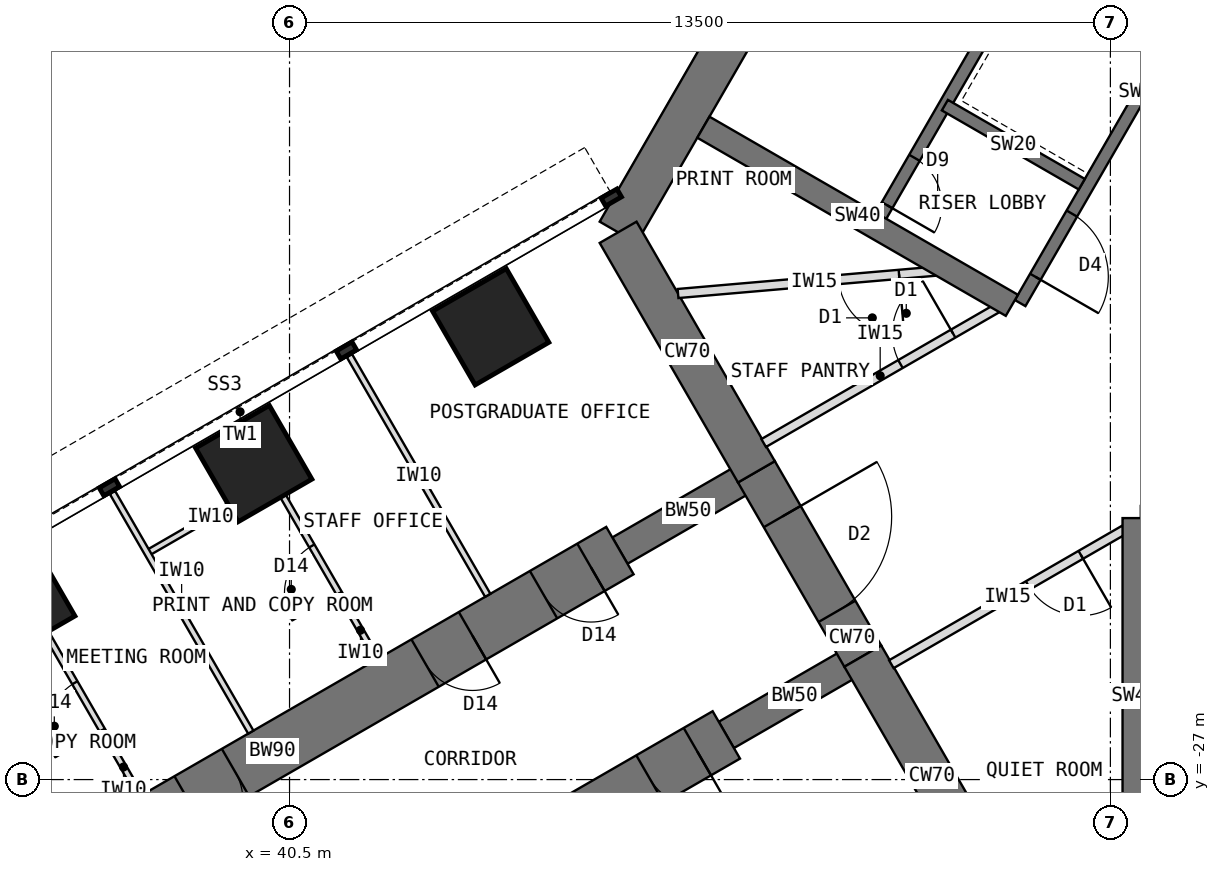
"""IFC4 building model, lengths in metres.
Left out: names, types, materials, properties, quantities, classifications, styles, units other than length and angle.
Written with IfcOpenShell. Run it as: python <this file> out.ifc"""

import sys

from ifc_helpers import new_model, si_unit, direction, frame, frame_2d, origin, origin_2d, place, context, subcontext, project, spatial, rectangle, extrude, element, fill, save


model = new_model("IFC4")
c1 = context("Model", 3, precision=1e-05, world=origin(), true_north=direction((0.0, 1.0)))
c2 = subcontext(c1, "Body", "Model", "MODEL_VIEW")
j1 = project(units=[si_unit("LENGTHUNIT", "METRE"), si_unit("PLANEANGLEUNIT", "RADIAN")], contexts=[c1])
p1 = place(None, origin())
s1 = spatial("IfcSite", under=j1, at=p1, CompositionType="ELEMENT")
p2 = place(p1, origin())
s2 = spatial("IfcBuilding", under=s1, at=p2, CompositionType="ELEMENT")
p3 = place(p2, frame((0.0, 0.0, 84.5)))
s3 = spatial("IfcBuildingStorey", under=s2, at=p3, CompositionType="ELEMENT", Elevation=84.5)
p4 = place(p3, frame((52.202, -7.092, 0.0), z_axis=(0.0, 0.0, 1.0), x_axis=(-0.500005998175, -0.866021940709, 0.0)))
e1 = element("IfcWall", 1, at=p4, inside=s3, PredefinedType="SHEAR", context=c2, shape_type="SweptSolid", body=[
    extrude(rectangle(XDim=12.596, YDim=0.7, at=frame_2d((6.298, 0.0))), origin(), (0.0, 0.0, 1.0), 4.0),
])
p5 = place(p3, frame((45.904, -18.0, 0.0), z_axis=(0.0, 0.0, 1.0), x_axis=(0.500024481964, -0.866011268655, 0.0)))
e2 = element("IfcWall", 2, at=p5, inside=s3, PredefinedType="SHEAR", context=c2, shape_type="SweptSolid", body=[
    extrude(rectangle(XDim=4.548, YDim=0.7, at=frame_2d((2.274, 0.0))), origin(), (0.0, 0.0, 1.0), 4.0),
])
p6 = place(p3, frame((48.178, -21.939, 0.0), z_axis=(0.0, 0.0, 1.0), x_axis=(0.500010275428, -0.866019471182, 0.0)))
e3 = element("IfcWall", 3, at=p6, inside=s3, PredefinedType="SHEAR", context=c2, shape_type="SweptSolid", body=[
    extrude(rectangle(XDim=3.5, YDim=0.7, at=frame_2d((1.75, 0.0))), origin(), (0.0, 0.0, 1.0), 4.0),
])
p7 = place(p6, frame((0.85, 0.0, 0.0)))
e4 = element("IfcOpeningElement", 4, at=p7, cuts=e3, PredefinedType="OPENING", context=c2, shape_type="SweptSolid", body=[
    extrude(rectangle(XDim=1.8, YDim=2.1, at=frame_2d((0.9, 1.05))), frame((0.0, 0.36, 0.0), z_axis=(0.0, -1.0, 0.0), x_axis=(1.0, 0.0, 0.0)), (0.0, 0.0, 1.0), 0.72),
])
p8 = place(p3, frame((49.928, -24.97, 0.0), z_axis=(0.0, 0.0, 1.0), x_axis=(0.499984222037, -0.866034513004, 0.0)))
e5 = element("IfcWall", 5, at=p8, inside=s3, PredefinedType="SHEAR", context=c2, shape_type="SweptSolid", body=[
    extrude(rectangle(XDim=4.548, YDim=0.7, at=frame_2d((2.274, 0.0))), origin(), (0.0, 0.0, 1.0), 4.0),
])
p9 = place(p3, frame((49.928, -24.97, 0.0), z_axis=(0.0, 0.0, 1.0), x_axis=(-0.866031863473, -0.499988811324, 0.0)))
e6 = element("IfcWall", 6, at=p9, inside=s3, PredefinedType="SHEAR", context=c2, shape_type="SweptSolid", body=[
    extrude(rectangle(XDim=2.592, YDim=0.5, at=frame_2d((1.296, 0.0))), origin(), (0.0, 0.0, 1.0), 4.0),
])
p10 = place(p3, frame((47.684, -26.266, 0.0), z_axis=(0.0, 0.0, 1.0), x_axis=(-0.866027579429, -0.499996231654, 0.0)))
e7 = element("IfcWall", 7, at=p10, inside=s3, PredefinedType="SHEAR", context=c2, shape_type="SweptSolid", body=[
    extrude(rectangle(XDim=13.2, YDim=0.9, at=frame_2d((6.6, 0.0))), origin(), (0.0, 0.0, 1.0), 4.0),
])
p11 = place(p10, frame((0.55, 0.0, 0.0)))
e8 = element("IfcOpeningElement", 8, at=p11, cuts=e7, PredefinedType="OPENING", context=c2, shape_type="SweptSolid", body=[
    extrude(rectangle(XDim=0.9, YDim=2.1, at=frame_2d((0.45, 1.05))), frame((0.0, 0.46, 0.0), z_axis=(0.0, -1.0, 0.0), x_axis=(1.0, 0.0, 0.0)), (0.0, 0.0, 1.0), 0.92),
])
p12 = place(p10, frame((2.8, 0.0, 0.0)))
e9 = element("IfcOpeningElement", 9, at=p12, cuts=e7, PredefinedType="OPENING", context=c2, shape_type="SweptSolid", body=[
    extrude(rectangle(XDim=0.9, YDim=2.1, at=frame_2d((0.45, 1.05))), frame((0.0, 0.46, 0.0), z_axis=(0.0, -1.0, 0.0), x_axis=(1.0, 0.0, 0.0)), (0.0, 0.0, 1.0), 0.92),
])
p13 = place(p10, frame((7.3, 0.0, 0.0)))
e10 = element("IfcOpeningElement", 10, at=p13, cuts=e7, PredefinedType="OPENING", context=c2, shape_type="SweptSolid", body=[
    extrude(rectangle(XDim=0.9, YDim=2.1, at=frame_2d((0.45, 1.05))), frame((0.0, 0.46, 0.0), z_axis=(0.0, -1.0, 0.0), x_axis=(1.0, 0.0, 0.0)), (0.0, 0.0, 1.0), 0.92),
])
p14 = place(p3, frame((48.178, -21.939, 0.0), z_axis=(0.0, 0.0, 1.0), x_axis=(-0.866072649678, -0.499918158782, 0.0)))
e11 = element("IfcWall", 11, at=p14, inside=s3, PredefinedType="SHEAR", context=c2, shape_type="SweptSolid", body=[
    extrude(rectangle(XDim=2.592, YDim=0.5, at=frame_2d((1.296, 0.0))), origin(), (0.0, 0.0, 1.0), 4.0),
])
p15 = place(p3, frame((45.934, -23.234, 0.0), z_axis=(0.0, 0.0, 1.0), x_axis=(-0.866019570528, -0.500010103361, 0.0)))
e12 = element("IfcWall", 12, at=p15, inside=s3, PredefinedType="SHEAR", context=c2, shape_type="SweptSolid", body=[
    extrude(rectangle(XDim=13.2, YDim=0.9, at=frame_2d((6.6, 0.0))), origin(), (0.0, 0.0, 1.0), 4.0),
])
p16 = place(p15, frame((0.55, 0.0, 0.0)))
e13 = element("IfcOpeningElement", 13, at=p16, cuts=e12, PredefinedType="OPENING", context=c2, shape_type="SweptSolid", body=[
    extrude(rectangle(XDim=0.9, YDim=2.1, at=frame_2d((0.45, 1.05))), frame((0.0, 0.46, 0.0), z_axis=(0.0, -1.0, 0.0), x_axis=(1.0, 0.0, 0.0)), (0.0, 0.0, 1.0), 0.92),
])
p17 = place(p15, frame((2.8, 0.0, 0.0)))
e14 = element("IfcOpeningElement", 14, at=p17, cuts=e12, PredefinedType="OPENING", context=c2, shape_type="SweptSolid", body=[
    extrude(rectangle(XDim=0.9, YDim=2.1, at=frame_2d((0.45, 1.05))), frame((0.0, 0.46, 0.0), z_axis=(0.0, -1.0, 0.0), x_axis=(1.0, 0.0, 0.0)), (0.0, 0.0, 1.0), 0.92),
])
p18 = place(p15, frame((7.3, 0.0, 0.0)))
e15 = element("IfcOpeningElement", 15, at=p18, cuts=e12, PredefinedType="OPENING", context=c2, shape_type="SweptSolid", body=[
    extrude(rectangle(XDim=0.9, YDim=2.1, at=frame_2d((0.45, 1.05))), frame((0.0, 0.46, 0.0), z_axis=(0.0, -1.0, 0.0), x_axis=(1.0, 0.0, 0.0)), (0.0, 0.0, 1.0), 0.92),
])
for number, where, z_axis, x_axis in (
    (16, (43.809, -19.554, 0.0), (0.0, 0.0, 1.0), (0.866, 0.5, 0.0)),
    (17, (39.912, -21.804, 0.0), (0.0, 0.0, 1.0), (0.866, 0.5, 0.0)),
    (18, (36.014, -24.054, 0.0), (0.0, 0.0, 1.0), (0.866, 0.5, 0.0)),
):
    element("IfcColumn", number, at=place(p3, frame(where, z_axis=z_axis, x_axis=x_axis)), inside=s3, PredefinedType="COLUMN", context=c2, shape_type="SweptSolid", body=[
        extrude(rectangle(XDim=1.4, YDim=1.4, at=origin_2d()), origin(), (0.0, 0.0, 1.0), 4.0),
    ])
p19 = place(p3, frame((56.516, -12.236, 0.0), z_axis=(0.0, 0.0, 1.0), x_axis=(-0.49999894854, -0.866026010844, 0.0)))
e19 = element("IfcWall", 19, at=p19, inside=s3, PredefinedType="SHEAR", context=c2, shape_type="SweptSolid", body=[
    extrude(rectangle(XDim=8.0, YDim=0.2, at=frame_2d((4.0, 0.0))), origin(), (0.0, 0.0, 1.0), 4.0),
])
p20 = place(p19, frame((6.3, 0.0, 0.0)))
e20 = element("IfcOpeningElement", 20, at=p20, cuts=e19, PredefinedType="OPENING", context=c2, shape_type="SweptSolid", body=[
    extrude(rectangle(XDim=1.2, YDim=2.1, at=frame_2d((0.6, 1.05))), frame((0.0, 0.11, 0.0), z_axis=(0.0, -1.0, 0.0), x_axis=(1.0, 0.0, 0.0)), (0.0, 0.0, 1.0), 0.22),
])
p21 = place(p3, frame((53.53, -17.209, 0.0), z_axis=(0.0, 0.0, 1.0), x_axis=(-0.866062058628, 0.499936506574, 0.0)))
e21 = element("IfcWall", 21, at=p21, inside=s3, PredefinedType="SHEAR", context=c2, shape_type="SweptSolid", body=[
    extrude(rectangle(XDim=2.6, YDim=0.2, at=frame_2d((1.3, 0.0))), origin(), (0.0, 0.0, 1.0), 4.0),
])
p22 = place(p3, frame((54.178, -10.886, 0.0), z_axis=(0.0, 0.0, 1.0), x_axis=(-0.49999894854, -0.866026010844, 0.0)))
e22 = element("IfcWall", 22, at=p22, inside=s3, PredefinedType="SHEAR", context=c2, shape_type="SweptSolid", body=[
    extrude(rectangle(XDim=8.0, YDim=0.2, at=frame_2d((4.0, 0.0))), origin(), (0.0, 0.0, 1.0), 4.0),
])
p23 = place(p22, frame((6.8, 0.0, 0.0)))
e23 = element("IfcOpeningElement", 23, at=p23, cuts=e22, PredefinedType="OPENING", context=c2, shape_type="SweptSolid", body=[
    extrude(rectangle(XDim=0.9, YDim=2.1, at=frame_2d((0.45, 1.05))), frame((0.0, 0.11, 0.0), z_axis=(0.0, -1.0, 0.0), x_axis=(1.0, 0.0, 0.0)), (0.0, 0.0, 1.0), 0.22),
])
for number, where, z_axis, x_axis in (
    (24, (52.38, -19.201, 0.0), (0.0, 0.0, 1.0), (-0.866, 0.5, 0.0)),
    (25, (54.4, -22.7, 0.0), (0.0, 0.0, 1.0), (0.0, -1.0, 0.0)),
):
    element("IfcWall", number, at=place(p3, frame(where, z_axis=z_axis, x_axis=x_axis)), inside=s3, PredefinedType="SHEAR", context=c2, shape_type="SweptSolid", body=[
        extrude(rectangle(XDim=5.858, YDim=0.4, at=frame_2d((2.929, 0.0))), origin(), (0.0, 0.0, 1.0), 4.0),
    ])
for number, where, z_axis, x_axis in (
    (26, (43.76, -23.97, 0.0), (0.0, 0.0, 1.0), (-0.5, 0.866, 0.0)),
    (27, (39.863, -26.22, 0.0), (0.0, 0.0, 1.0), (-0.5, 0.866, 0.0)),
):
    element("IfcWall", number, at=place(p3, frame(where, z_axis=z_axis, x_axis=x_axis)), inside=s3, PredefinedType="PARTITIONING", context=c2, shape_type="SweptSolid", body=[
        extrude(rectangle(XDim=4.55, YDim=0.1, at=frame_2d((2.275, 0.0))), origin(), (0.0, 0.0, 1.0), 3.8),
    ])
p24 = place(p3, frame((40.241, -22.075, 0.0), z_axis=(0.0, 0.0, 1.0), x_axis=(-0.866024647952, -0.500001309137, 0.0)))
e28 = element("IfcWall", 28, at=p24, inside=s3, PredefinedType="PARTITIONING", context=c2, shape_type="SweptSolid", body=[
    extrude(rectangle(XDim=2.4, YDim=0.1, at=frame_2d((1.2, 0.0))), origin(), (0.0, 0.0, 1.0), 3.8),
])
p25 = place(p3, frame((41.941, -25.02, 0.0), z_axis=(0.0, 0.0, 1.0), x_axis=(-0.499977295307, 0.866038511948, 0.0)))
e29 = element("IfcWall", 29, at=p25, inside=s3, PredefinedType="PARTITIONING", context=c2, shape_type="SweptSolid", body=[
    extrude(rectangle(XDim=3.4, YDim=0.1, at=frame_2d((1.7, 0.0))), origin(), (0.0, 0.0, 1.0), 3.8),
])
p26 = place(p25, frame((1.25, 0.0, 0.0)))
e30 = element("IfcOpeningElement", 30, at=p26, cuts=e29, PredefinedType="OPENING", context=c2, shape_type="SweptSolid", body=[
    extrude(rectangle(XDim=0.9, YDim=2.1, at=frame_2d((0.45, 1.05))), frame((0.0, 0.06, 0.0), z_axis=(0.0, -1.0, 0.0), x_axis=(1.0, 0.0, 0.0)), (0.0, 0.0, 1.0), 0.12),
])
p27 = place(p3, frame((38.044, -27.27, 0.0), z_axis=(0.0, 0.0, 1.0), x_axis=(-0.500031147688, 0.866007419912, 0.0)))
e31 = element("IfcWall", 31, at=p27, inside=s3, PredefinedType="PARTITIONING", context=c2, shape_type="SweptSolid", body=[
    extrude(rectangle(XDim=3.4, YDim=0.1, at=frame_2d((1.7, 0.0))), origin(), (0.0, 0.0, 1.0), 3.8),
])
p28 = place(p27, frame((1.25, 0.0, 0.0)))
e32 = element("IfcOpeningElement", 32, at=p28, cuts=e31, PredefinedType="OPENING", context=c2, shape_type="SweptSolid", body=[
    extrude(rectangle(XDim=0.9, YDim=2.1, at=frame_2d((0.45, 1.05))), frame((0.0, 0.06, 0.0), z_axis=(0.0, -1.0, 0.0), x_axis=(1.0, 0.0, 0.0)), (0.0, 0.0, 1.0), 0.12),
])
p29 = place(p3, frame((48.298, -21.466, 0.0), z_axis=(0.0, 0.0, 1.0), x_axis=(0.866021148949, 0.500007369519, 0.0)))
e33 = element("IfcWall", 33, at=p29, inside=s3, PredefinedType="PARTITIONING", context=c2, shape_type="SweptSolid", body=[
    extrude(rectangle(XDim=4.426, YDim=0.15, at=frame_2d((2.213, 0.0))), origin(), (0.0, 0.0, 1.0), 3.8),
])
p30 = place(p29, frame((2.598, 0.0, 0.0)))
e34 = element("IfcOpeningElement", 34, at=p30, cuts=e33, PredefinedType="OPENING", context=c2, shape_type="SweptSolid", body=[
    extrude(rectangle(XDim=1.0, YDim=2.1, at=frame_2d((0.5, 1.05))), frame((0.0, 0.085, 0.0), z_axis=(0.0, -1.0, 0.0), x_axis=(1.0, 0.0, 0.0)), (0.0, 0.0, 1.0), 0.17),
])
p31 = place(p3, frame((54.23, -22.89, 0.0), z_axis=(0.0, 0.0, 1.0), x_axis=(-0.866021148949, -0.500007369519, 0.0)))
e35 = element("IfcWall", 35, at=p31, inside=s3, PredefinedType="PARTITIONING", context=c2, shape_type="SweptSolid", body=[
    extrude(rectangle(XDim=4.426, YDim=0.15, at=frame_2d((2.213, 0.0))), origin(), (0.0, 0.0, 1.0), 3.8),
])
p32 = place(p31, frame((0.828, 0.0, 0.0)))
e36 = element("IfcOpeningElement", 36, at=p32, cuts=e35, PredefinedType="OPENING", context=c2, shape_type="SweptSolid", body=[
    extrude(rectangle(XDim=1.0, YDim=2.1, at=frame_2d((0.5, 1.05))), frame((0.0, 0.085, 0.0), z_axis=(0.0, -1.0, 0.0), x_axis=(1.0, 0.0, 0.0)), (0.0, 0.0, 1.0), 0.17),
])
p33 = place(p3, frame((51.371, -18.618, 0.0), z_axis=(0.0, 0.0, 1.0), x_axis=(-0.996259708579, -0.086409450071, 0.0)))
e37 = element("IfcWall", 37, at=p33, inside=s3, PredefinedType="PARTITIONING", context=c2, shape_type="SweptSolid", body=[
    extrude(rectangle(XDim=4.498, YDim=0.15, at=frame_2d((2.249, 0.0))), origin(), (0.0, 0.0, 1.0), 3.8),
])
p34 = place(p33, frame((0.849, 0.0, 0.0)))
e38 = element("IfcOpeningElement", 38, at=p34, cuts=e37, PredefinedType="OPENING", context=c2, shape_type="SweptSolid", body=[
    extrude(rectangle(XDim=1.0, YDim=2.1, at=frame_2d((0.5, 1.05))), frame((0.0, 0.085, 0.0), z_axis=(0.0, -1.0, 0.0), x_axis=(1.0, 0.0, 0.0)), (0.0, 0.0, 1.0), 0.17),
])
p35 = place(p20, origin())
e39 = element("IfcDoor", 39, at=p35, inside=s3, OperationType="SINGLE_SWING_RIGHT", PredefinedType="DOOR", context=c2, shape_type="SweptSolid", body=[
    extrude(rectangle(XDim=1.2, YDim=2.1, at=frame_2d((0.6, 1.05))), frame((0.0, 0.025, 0.0), z_axis=(0.0, -1.0, 0.0), x_axis=(1.0, 0.0, 0.0)), (0.0, 0.0, 1.0), 0.05),
])
fill(e20, e39)
p36 = place(p23, origin())
e40 = element("IfcDoor", 40, at=p36, inside=s3, OperationType="SINGLE_SWING_RIGHT", PredefinedType="DOOR", context=c2, shape_type="SweptSolid", body=[
    extrude(rectangle(XDim=0.9, YDim=2.1, at=frame_2d((0.45, 1.05))), frame((0.0, 0.025, 0.0), z_axis=(0.0, -1.0, 0.0), x_axis=(1.0, 0.0, 0.0)), (0.0, 0.0, 1.0), 0.05),
])
fill(e23, e40)
p37 = place(p7, origin())
e41 = element("IfcDoor", 41, at=p37, inside=s3, OperationType="DOUBLE_DOOR_DOUBLE_SWING", PredefinedType="DOOR", context=c2, shape_type="SweptSolid", body=[
    extrude(rectangle(XDim=1.72, YDim=2.06, at=frame_2d((0.9, 1.03))), frame((0.0, 0.025, 0.0), z_axis=(0.0, -1.0, 0.0), x_axis=(1.0, 0.0, 0.0)), (0.0, 0.0, 1.0), 0.05),
    extrude(rectangle(XDim=0.04, YDim=2.1, at=frame_2d((0.02, 1.05))), frame((0.0, 0.35, 0.0), z_axis=(0.0, -1.0, 0.0), x_axis=(1.0, 0.0, 0.0)), (0.0, 0.0, 1.0), 0.699),
    extrude(rectangle(XDim=0.04, YDim=2.1, at=frame_2d((1.78, 1.05))), frame((0.0, 0.35, 0.0), z_axis=(0.0, -1.0, 0.0), x_axis=(1.0, 0.0, 0.0)), (0.0, 0.0, 1.0), 0.699),
    extrude(rectangle(XDim=1.72, YDim=0.04, at=frame_2d((0.9, 2.08))), frame((0.0, 0.35, 0.0), z_axis=(0.0, -1.0, 0.0), x_axis=(1.0, 0.0, 0.0)), (0.0, 0.0, 1.0), 0.699),
])
fill(e4, e41)
p38 = place(p26, origin())
e42 = element("IfcDoor", 42, at=p38, inside=s3, OperationType="SINGLE_SWING_LEFT", PredefinedType="DOOR", context=c2, shape_type="SweptSolid", body=[
    extrude(rectangle(XDim=0.9, YDim=2.1, at=frame_2d((0.45, 1.05))), frame((0.0, 0.025, 0.0), z_axis=(0.0, -1.0, 0.0), x_axis=(1.0, 0.0, 0.0)), (0.0, 0.0, 1.0), 0.05),
])
fill(e30, e42)
p39 = place(p28, origin())
e43 = element("IfcDoor", 43, at=p39, inside=s3, OperationType="SINGLE_SWING_LEFT", PredefinedType="DOOR", context=c2, shape_type="SweptSolid", body=[
    extrude(rectangle(XDim=0.9, YDim=2.1, at=frame_2d((0.45, 1.05))), frame((0.0, 0.025, 0.0), z_axis=(0.0, -1.0, 0.0), x_axis=(1.0, 0.0, 0.0)), (0.0, 0.0, 1.0), 0.05),
])
fill(e32, e43)
p40 = place(p34, origin())
e44 = element("IfcDoor", 44, at=p40, inside=s3, OperationType="SINGLE_SWING_LEFT", PredefinedType="DOOR", context=c2, shape_type="SweptSolid", body=[
    extrude(rectangle(XDim=1.0, YDim=2.1, at=frame_2d((0.5, 1.05))), frame((0.0, 0.025, 0.0), z_axis=(0.0, -1.0, 0.0), x_axis=(1.0, 0.0, 0.0)), (0.0, 0.0, 1.0), 0.05),
])
fill(e38, e44)
p41 = place(p30, origin())
e45 = element("IfcDoor", 45, at=p41, inside=s3, OperationType="SINGLE_SWING_RIGHT", PredefinedType="DOOR", context=c2, shape_type="SweptSolid", body=[
    extrude(rectangle(XDim=1.0, YDim=2.1, at=frame_2d((0.5, 1.05))), frame((0.0, 0.025, 0.0), z_axis=(0.0, -1.0, 0.0), x_axis=(1.0, 0.0, 0.0)), (0.0, 0.0, 1.0), 0.05),
])
fill(e34, e45)
p42 = place(p32, origin())
e46 = element("IfcDoor", 46, at=p42, inside=s3, OperationType="SINGLE_SWING_LEFT", PredefinedType="DOOR", context=c2, shape_type="SweptSolid", body=[
    extrude(rectangle(XDim=1.0, YDim=2.1, at=frame_2d((0.5, 1.05))), frame((0.0, 0.025, 0.0), z_axis=(0.0, -1.0, 0.0), x_axis=(1.0, 0.0, 0.0)), (0.0, 0.0, 1.0), 0.05),
])
fill(e36, e46)
p43 = place(p11, origin())
e47 = element("IfcDoor", 47, at=p43, inside=s3, OperationType="SINGLE_SWING_LEFT", PredefinedType="DOOR", context=c2, shape_type="SweptSolid", body=[
    extrude(rectangle(XDim=0.82, YDim=2.06, at=frame_2d((0.45, 1.03))), frame((0.0, 0.025, 0.0), z_axis=(0.0, -1.0, 0.0), x_axis=(1.0, 0.0, 0.0)), (0.0, 0.0, 1.0), 0.05),
    extrude(rectangle(XDim=0.04, YDim=2.1, at=frame_2d((0.02, 1.05))), frame((0.0, 0.45, 0.0), z_axis=(0.0, -1.0, 0.0), x_axis=(1.0, 0.0, 0.0)), (0.0, 0.0, 1.0), 0.899),
    extrude(rectangle(XDim=0.04, YDim=2.1, at=frame_2d((0.88, 1.05))), frame((0.0, 0.45, 0.0), z_axis=(0.0, -1.0, 0.0), x_axis=(1.0, 0.0, 0.0)), (0.0, 0.0, 1.0), 0.899),
    extrude(rectangle(XDim=0.82, YDim=0.04, at=frame_2d((0.45, 2.08))), frame((0.0, 0.45, 0.0), z_axis=(0.0, -1.0, 0.0), x_axis=(1.0, 0.0, 0.0)), (0.0, 0.0, 1.0), 0.899),
])
fill(e8, e47)
p44 = place(p16, origin())
e48 = element("IfcDoor", 48, at=p44, inside=s3, OperationType="SINGLE_SWING_LEFT", PredefinedType="DOOR", context=c2, shape_type="SweptSolid", body=[
    extrude(rectangle(XDim=0.82, YDim=2.06, at=frame_2d((0.45, 1.03))), frame((0.0, 0.025, 0.0), z_axis=(0.0, -1.0, 0.0), x_axis=(1.0, 0.0, 0.0)), (0.0, 0.0, 1.0), 0.05),
    extrude(rectangle(XDim=0.04, YDim=2.1, at=frame_2d((0.02, 1.05))), frame((0.0, 0.45, 0.0), z_axis=(0.0, -1.0, 0.0), x_axis=(1.0, 0.0, 0.0)), (0.0, 0.0, 1.0), 0.899),
    extrude(rectangle(XDim=0.04, YDim=2.1, at=frame_2d((0.88, 1.05))), frame((0.0, 0.45, 0.0), z_axis=(0.0, -1.0, 0.0), x_axis=(1.0, 0.0, 0.0)), (0.0, 0.0, 1.0), 0.899),
    extrude(rectangle(XDim=0.82, YDim=0.04, at=frame_2d((0.45, 2.08))), frame((0.0, 0.45, 0.0), z_axis=(0.0, -1.0, 0.0), x_axis=(1.0, 0.0, 0.0)), (0.0, 0.0, 1.0), 0.899),
])
fill(e13, e48)
p45 = place(p17, origin())
e49 = element("IfcDoor", 49, at=p45, inside=s3, OperationType="SINGLE_SWING_LEFT", PredefinedType="DOOR", context=c2, shape_type="SweptSolid", body=[
    extrude(rectangle(XDim=0.82, YDim=2.06, at=frame_2d((0.45, 1.03))), frame((0.0, 0.025, 0.0), z_axis=(0.0, -1.0, 0.0), x_axis=(1.0, 0.0, 0.0)), (0.0, 0.0, 1.0), 0.05),
    extrude(rectangle(XDim=0.04, YDim=2.1, at=frame_2d((0.02, 1.05))), frame((0.0, 0.45, 0.0), z_axis=(0.0, -1.0, 0.0), x_axis=(1.0, 0.0, 0.0)), (0.0, 0.0, 1.0), 0.899),
    extrude(rectangle(XDim=0.04, YDim=2.1, at=frame_2d((0.88, 1.05))), frame((0.0, 0.45, 0.0), z_axis=(0.0, -1.0, 0.0), x_axis=(1.0, 0.0, 0.0)), (0.0, 0.0, 1.0), 0.899),
    extrude(rectangle(XDim=0.82, YDim=0.04, at=frame_2d((0.45, 2.08))), frame((0.0, 0.45, 0.0), z_axis=(0.0, -1.0, 0.0), x_axis=(1.0, 0.0, 0.0)), (0.0, 0.0, 1.0), 0.899),
])
fill(e14, e49)
p46 = place(p18, origin())
e50 = element("IfcDoor", 50, at=p46, inside=s3, OperationType="SINGLE_SWING_RIGHT", PredefinedType="DOOR", context=c2, shape_type="SweptSolid", body=[
    extrude(rectangle(XDim=0.82, YDim=2.06, at=frame_2d((0.45, 1.03))), frame((0.0, 0.025, 0.0), z_axis=(0.0, -1.0, 0.0), x_axis=(1.0, 0.0, 0.0)), (0.0, 0.0, 1.0), 0.05),
    extrude(rectangle(XDim=0.04, YDim=2.1, at=frame_2d((0.02, 1.05))), frame((0.0, 0.45, 0.0), z_axis=(0.0, -1.0, 0.0), x_axis=(1.0, 0.0, 0.0)), (0.0, 0.0, 1.0), 0.899),
    extrude(rectangle(XDim=0.04, YDim=2.1, at=frame_2d((0.88, 1.05))), frame((0.0, 0.45, 0.0), z_axis=(0.0, -1.0, 0.0), x_axis=(1.0, 0.0, 0.0)), (0.0, 0.0, 1.0), 0.899),
    extrude(rectangle(XDim=0.82, YDim=0.04, at=frame_2d((0.45, 2.08))), frame((0.0, 0.45, 0.0), z_axis=(0.0, -1.0, 0.0), x_axis=(1.0, 0.0, 0.0)), (0.0, 0.0, 1.0), 0.899),
])
fill(e15, e50)
save(model, sys.argv[1])
